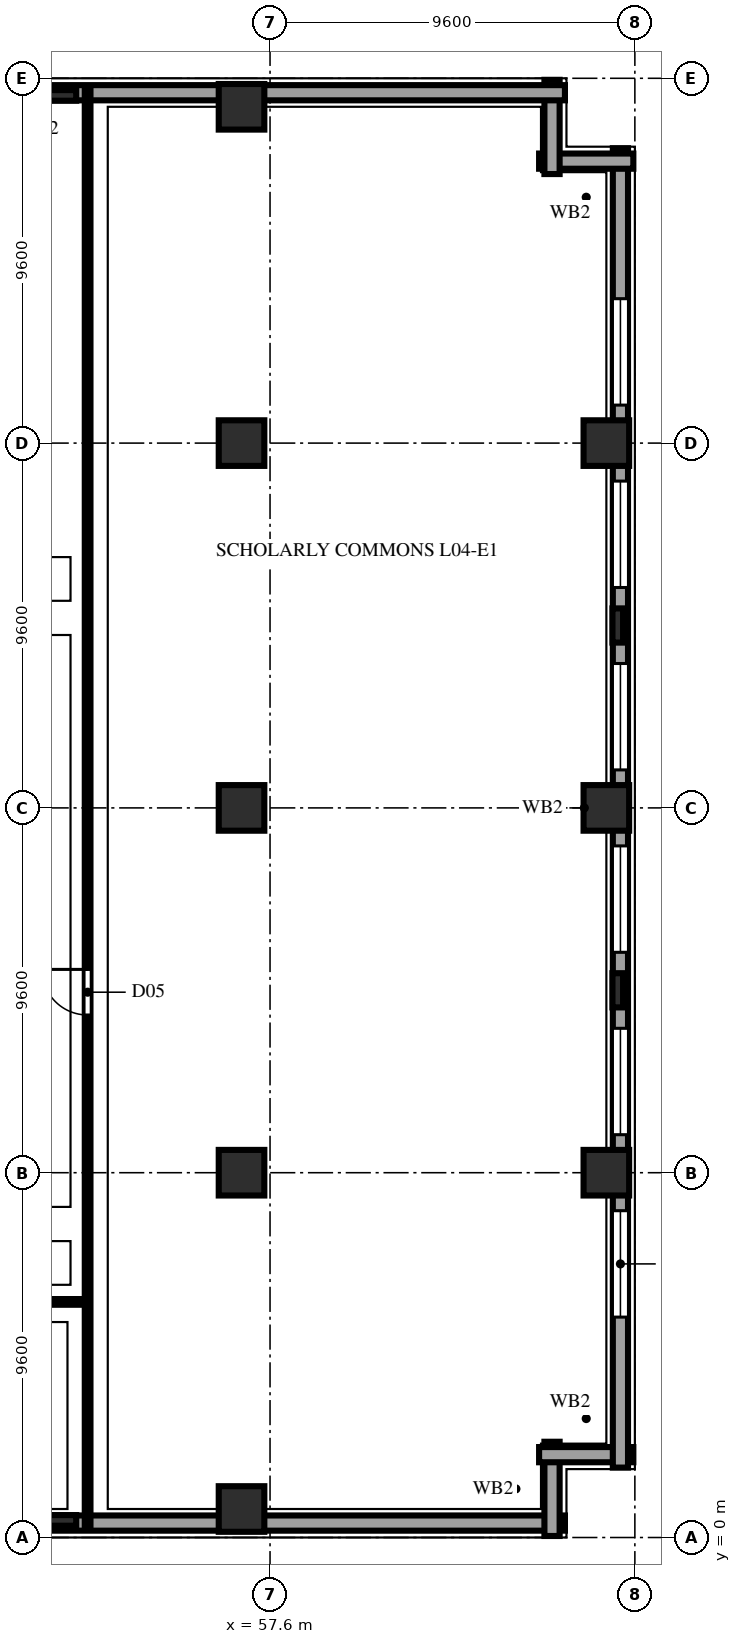
"""IFC4 building model, lengths in metres.
Left out: names, types, materials, properties, quantities, classifications, styles, units other than length and angle.
Written with IfcOpenShell. Run it as: python <this file> out.ifc"""

import sys

from ifc_helpers import new_model, si_unit, direction, frame, frame_2d, origin, origin_2d, place, context, subcontext, project, spatial, rectangle, extrude, element, fill, save


model = new_model("IFC4")
c1 = context("Model", 3, precision=1e-05, world=origin(), true_north=direction((0.0, 1.0)))
c2 = subcontext(c1, "Body", "Model", "MODEL_VIEW")
j1 = project(units=[si_unit("LENGTHUNIT", "METRE"), si_unit("PLANEANGLEUNIT", "RADIAN")], contexts=[c1])
p1 = place(None, origin())
s1 = spatial("IfcSite", under=j1, at=p1, CompositionType="ELEMENT")
p2 = place(p1, origin())
s2 = spatial("IfcBuilding", under=s1, at=p2, CompositionType="ELEMENT")
p3 = place(p2, frame((0.0, 0.0, 19.6)))
s3 = spatial("IfcBuildingStorey", under=s2, at=p3, CompositionType="ELEMENT", Elevation=19.6)
for number, where, z_axis, x_axis in (
    (1, (56.85, 0.75, 0.0), (0.0, 0.0, 1.0), (1.0, 0.0, 0.0)),
    (2, (56.85, 9.6, 0.0), (0.0, 0.0, 1.0), (1.0, 0.0, 0.0)),
    (3, (56.85, 19.2, 0.0), (0.0, 0.0, 1.0), (1.0, 0.0, 0.0)),
    (4, (56.85, 28.8, 0.0), (0.0, 0.0, 1.0), (1.0, 0.0, 0.0)),
    (5, (56.85, 37.65, 0.0), (0.0, 0.0, 1.0), (1.0, 0.0, 0.0)),
    (6, (66.45, 9.6, 0.0), (0.0, 0.0, 1.0), (1.0, 0.0, 0.0)),
    (7, (66.45, 19.2, 0.0), (0.0, 0.0, 1.0), (1.0, 0.0, 0.0)),
    (8, (66.45, 28.8, 0.0), (0.0, 0.0, 1.0), (1.0, 0.0, 0.0)),
):
    element("IfcColumn", number, at=place(p3, frame(where, z_axis=z_axis, x_axis=x_axis)), inside=s3, PredefinedType="COLUMN", context=c2, shape_type="SweptSolid", body=[
        extrude(rectangle(XDim=1.2, YDim=1.2, at=origin_2d()), origin(), (0.0, 0.0, 1.0), 4.6),
    ])
for number, where, z_axis, x_axis in (
    (9, (52.05, 0.45, 0.0), (0.0, 0.0, 1.0), (1.0, 0.0, 0.0)),
    (10, (66.75, 14.4, 0.0), (0.0, 0.0, 1.0), (0.0, 1.0, 0.0)),
    (11, (66.75, 24.0, 0.0), (0.0, 0.0, 1.0), (0.0, 1.0, 0.0)),
    (12, (52.05, 37.95, 0.0), (0.0, 0.0, 1.0), (1.0, 0.0, 0.0)),
):
    element("IfcColumn", number, at=place(p3, frame(where, z_axis=z_axis, x_axis=x_axis)), inside=s3, PredefinedType="PILASTER", context=c2, shape_type="SweptSolid", body=[
        extrude(rectangle(XDim=0.9, YDim=0.28, at=origin_2d()), origin(), (0.0, 0.0, 1.0), 4.6),
    ])
p4 = place(p3, frame((1.84, 0.38, 0.0), z_axis=(0.0, 0.0, 1.0), x_axis=(1.0, 0.0, 0.0)))
e13 = element("IfcWall", 13, at=p4, inside=s3, PredefinedType="SOLIDWALL", context=c2, shape_type="SweptSolid", body=[
    extrude(rectangle(XDim=63.52, YDim=0.4, at=frame_2d((31.76, 0.0))), origin(), (0.0, 0.0, 1.0), 4.34),
])
p5 = place(p4, frame((3.96, 0.0, 0.75)))
e14 = element("IfcOpeningElement", 14, at=p5, cuts=e13, PredefinedType="OPENING", context=c2, shape_type="SweptSolid", body=[
    extrude(rectangle(XDim=2.8, YDim=2.3, at=frame_2d((1.4, 1.15))), frame((0.0, 0.212, 0.0), z_axis=(0.0, -1.0, 0.0), x_axis=(1.0, 0.0, 0.0)), (0.0, 0.0, 1.0), 0.424),
])
p6 = place(p4, frame((8.76, 0.0, 0.75)))
e15 = element("IfcOpeningElement", 15, at=p6, cuts=e13, PredefinedType="OPENING", context=c2, shape_type="SweptSolid", body=[
    extrude(rectangle(XDim=2.8, YDim=2.3, at=frame_2d((1.4, 1.15))), frame((0.0, 0.212, 0.0), z_axis=(0.0, -1.0, 0.0), x_axis=(1.0, 0.0, 0.0)), (0.0, 0.0, 1.0), 0.424),
])
p7 = place(p4, frame((13.56, 0.0, 0.75)))
e16 = element("IfcOpeningElement", 16, at=p7, cuts=e13, PredefinedType="OPENING", context=c2, shape_type="SweptSolid", body=[
    extrude(rectangle(XDim=2.8, YDim=2.3, at=frame_2d((1.4, 1.15))), frame((0.0, 0.212, 0.0), z_axis=(0.0, -1.0, 0.0), x_axis=(1.0, 0.0, 0.0)), (0.0, 0.0, 1.0), 0.424),
])
p8 = place(p4, frame((18.36, 0.0, 0.75)))
e17 = element("IfcOpeningElement", 17, at=p8, cuts=e13, PredefinedType="OPENING", context=c2, shape_type="SweptSolid", body=[
    extrude(rectangle(XDim=2.8, YDim=2.3, at=frame_2d((1.4, 1.15))), frame((0.0, 0.212, 0.0), z_axis=(0.0, -1.0, 0.0), x_axis=(1.0, 0.0, 0.0)), (0.0, 0.0, 1.0), 0.424),
])
p9 = place(p4, frame((23.16, 0.0, 0.75)))
e18 = element("IfcOpeningElement", 18, at=p9, cuts=e13, PredefinedType="OPENING", context=c2, shape_type="SweptSolid", body=[
    extrude(rectangle(XDim=2.8, YDim=2.3, at=frame_2d((1.4, 1.15))), frame((0.0, 0.212, 0.0), z_axis=(0.0, -1.0, 0.0), x_axis=(1.0, 0.0, 0.0)), (0.0, 0.0, 1.0), 0.424),
])
p10 = place(p4, frame((27.96, 0.0, 0.75)))
e19 = element("IfcOpeningElement", 19, at=p10, cuts=e13, PredefinedType="OPENING", context=c2, shape_type="SweptSolid", body=[
    extrude(rectangle(XDim=2.8, YDim=2.3, at=frame_2d((1.4, 1.15))), frame((0.0, 0.212, 0.0), z_axis=(0.0, -1.0, 0.0), x_axis=(1.0, 0.0, 0.0)), (0.0, 0.0, 1.0), 0.424),
])
for number, where, z_axis, x_axis in (
    (20, (65.02, 0.04, 0.0), (0.0, 0.0, 1.0), (0.0, 1.0, 0.0)),
    (21, (64.68, 2.18, 0.0), (0.0, 0.0, 1.0), (1.0, 0.0, 0.0)),
):
    element("IfcWall", number, at=place(p3, frame(where, z_axis=z_axis, x_axis=x_axis)), inside=s3, PredefinedType="SOLIDWALL", context=c2, shape_type="SweptSolid", body=[
        extrude(rectangle(XDim=2.48, YDim=0.4, at=frame_2d((1.24, 0.0))), origin(), (0.0, 0.0, 1.0), 4.34),
    ])
p11 = place(p3, frame((66.82, 1.84, 0.0), z_axis=(0.0, 0.0, 1.0), x_axis=(0.0, 1.0, 0.0)))
e22 = element("IfcWall", 22, at=p11, inside=s3, PredefinedType="SOLIDWALL", context=c2, shape_type="SweptSolid", body=[
    extrude(rectangle(XDim=34.72, YDim=0.4, at=frame_2d((17.36, 0.0))), origin(), (0.0, 0.0, 1.0), 4.34),
])
p12 = place(p11, frame((3.96, 0.0, 0.75)))
e23 = element("IfcOpeningElement", 23, at=p12, cuts=e22, PredefinedType="OPENING", context=c2, shape_type="SweptSolid", body=[
    extrude(rectangle(XDim=2.8, YDim=2.3, at=frame_2d((1.4, 1.15))), frame((0.0, 0.212, 0.0), z_axis=(0.0, -1.0, 0.0), x_axis=(1.0, 0.0, 0.0)), (0.0, 0.0, 1.0), 0.424),
])
p13 = place(p11, frame((8.76, 0.0, 0.75)))
e24 = element("IfcOpeningElement", 24, at=p13, cuts=e22, PredefinedType="OPENING", context=c2, shape_type="SweptSolid", body=[
    extrude(rectangle(XDim=2.8, YDim=2.3, at=frame_2d((1.4, 1.15))), frame((0.0, 0.212, 0.0), z_axis=(0.0, -1.0, 0.0), x_axis=(1.0, 0.0, 0.0)), (0.0, 0.0, 1.0), 0.424),
])
p14 = place(p11, frame((13.56, 0.0, 0.75)))
e25 = element("IfcOpeningElement", 25, at=p14, cuts=e22, PredefinedType="OPENING", context=c2, shape_type="SweptSolid", body=[
    extrude(rectangle(XDim=2.8, YDim=2.3, at=frame_2d((1.4, 1.15))), frame((0.0, 0.212, 0.0), z_axis=(0.0, -1.0, 0.0), x_axis=(1.0, 0.0, 0.0)), (0.0, 0.0, 1.0), 0.424),
])
p15 = place(p11, frame((18.36, 0.0, 0.75)))
e26 = element("IfcOpeningElement", 26, at=p15, cuts=e22, PredefinedType="OPENING", context=c2, shape_type="SweptSolid", body=[
    extrude(rectangle(XDim=2.8, YDim=2.3, at=frame_2d((1.4, 1.15))), frame((0.0, 0.212, 0.0), z_axis=(0.0, -1.0, 0.0), x_axis=(1.0, 0.0, 0.0)), (0.0, 0.0, 1.0), 0.424),
])
p16 = place(p11, frame((23.16, 0.0, 0.75)))
e27 = element("IfcOpeningElement", 27, at=p16, cuts=e22, PredefinedType="OPENING", context=c2, shape_type="SweptSolid", body=[
    extrude(rectangle(XDim=2.8, YDim=2.3, at=frame_2d((1.4, 1.15))), frame((0.0, 0.212, 0.0), z_axis=(0.0, -1.0, 0.0), x_axis=(1.0, 0.0, 0.0)), (0.0, 0.0, 1.0), 0.424),
])
p17 = place(p11, frame((27.96, 0.0, 0.75)))
e28 = element("IfcOpeningElement", 28, at=p17, cuts=e22, PredefinedType="OPENING", context=c2, shape_type="SweptSolid", body=[
    extrude(rectangle(XDim=2.8, YDim=2.3, at=frame_2d((1.4, 1.15))), frame((0.0, 0.212, 0.0), z_axis=(0.0, -1.0, 0.0), x_axis=(1.0, 0.0, 0.0)), (0.0, 0.0, 1.0), 0.424),
])
p18 = place(p3, frame((67.16, 36.22, 0.0), z_axis=(0.0, 0.0, 1.0), x_axis=(-1.0, 0.0, 0.0)))
e29 = element("IfcWall", 29, at=p18, inside=s3, PredefinedType="SOLIDWALL", context=c2, shape_type="SweptSolid", body=[
    extrude(rectangle(XDim=2.48, YDim=0.4, at=frame_2d((1.24, 0.0))), origin(), (0.0, 0.0, 1.0), 4.34),
])
p19 = place(p3, frame((65.02, 35.88, 0.0), z_axis=(0.0, 0.0, 1.0), x_axis=(0.0, 1.0, 0.0)))
e30 = element("IfcWall", 30, at=p19, inside=s3, PredefinedType="SOLIDWALL", context=c2, shape_type="SweptSolid", body=[
    extrude(rectangle(XDim=2.48, YDim=0.4, at=frame_2d((1.24, 0.0))), origin(), (0.0, 0.0, 1.0), 4.34),
])
p20 = place(p3, frame((65.36, 38.02, 0.0), z_axis=(0.0, 0.0, 1.0), x_axis=(-1.0, 0.0, 0.0)))
e31 = element("IfcWall", 31, at=p20, inside=s3, PredefinedType="SOLIDWALL", context=c2, shape_type="SweptSolid", body=[
    extrude(rectangle(XDim=27.68, YDim=0.4, at=frame_2d((13.84, 0.0))), origin(), (0.0, 0.0, 1.0), 4.34),
])
p21 = place(p3, frame((0.22, 6.2, 0.0), z_axis=(0.0, 0.0, 1.0), x_axis=(1.0, 0.0, 0.0)))
e32 = element("IfcWall", 32, at=p21, inside=s3, PredefinedType="PARTITIONING", context=c2, shape_type="SweptSolid", body=[
    extrude(rectangle(XDim=52.58, YDim=0.15, at=frame_2d((26.29, 0.0))), origin(), (0.0, 0.0, 1.0), 4.34),
])
p22 = place(p21, frame((13.58, 0.0, 0.0)))
e33 = element("IfcOpeningElement", 33, at=p22, cuts=e32, PredefinedType="OPENING", context=c2, shape_type="SweptSolid", body=[
    extrude(rectangle(XDim=1.2, YDim=2.2, at=frame_2d((0.6, 1.1))), frame((0.0, 0.087, 0.0), z_axis=(0.0, -1.0, 0.0), x_axis=(1.0, 0.0, 0.0)), (0.0, 0.0, 1.0), 0.174),
])
p23 = place(p21, frame((23.28, 0.0, 0.0)))
e34 = element("IfcOpeningElement", 34, at=p23, cuts=e32, PredefinedType="OPENING", context=c2, shape_type="SweptSolid", body=[
    extrude(rectangle(XDim=1.2, YDim=2.2, at=frame_2d((0.6, 1.1))), frame((0.0, 0.087, 0.0), z_axis=(0.0, -1.0, 0.0), x_axis=(1.0, 0.0, 0.0)), (0.0, 0.0, 1.0), 0.174),
])
p24 = place(p21, frame((41.18, 0.0, 0.0)))
e35 = element("IfcOpeningElement", 35, at=p24, cuts=e32, PredefinedType="OPENING", context=c2, shape_type="SweptSolid", body=[
    extrude(rectangle(XDim=2.0, YDim=2.3, at=frame_2d((1.0, 1.15))), frame((0.0, 0.087, 0.0), z_axis=(0.0, -1.0, 0.0), x_axis=(1.0, 0.0, 0.0)), (0.0, 0.0, 1.0), 0.174),
])
p25 = place(p3, frame((52.8, 0.22, 0.0), z_axis=(0.0, 0.0, 1.0), x_axis=(0.0, 1.0, 0.0)))
e36 = element("IfcWall", 36, at=p25, inside=s3, PredefinedType="PARTITIONING", context=c2, shape_type="SweptSolid", body=[
    extrude(rectangle(XDim=37.96, YDim=0.15, at=frame_2d((18.98, 0.0))), origin(), (0.0, 0.0, 1.0), 4.34),
])
p26 = place(p25, frame((13.53, 0.0, 0.0)))
e37 = element("IfcOpeningElement", 37, at=p26, cuts=e36, PredefinedType="OPENING", context=c2, shape_type="SweptSolid", body=[
    extrude(rectangle(XDim=1.2, YDim=2.2, at=frame_2d((0.6, 1.1))), frame((0.0, 0.087, 0.0), z_axis=(0.0, -1.0, 0.0), x_axis=(1.0, 0.0, 0.0)), (0.0, 0.0, 1.0), 0.174),
])
p27 = place(p12, origin())
e38 = element("IfcWindow", 38, at=p27, inside=s3, PartitioningType="TRIPLE_PANEL_VERTICAL", PredefinedType="WINDOW", context=c2, shape_type="SweptSolid", body=[
    extrude(rectangle(XDim=2.8, YDim=2.3, at=frame_2d((1.4, 1.15))), frame((0.0, 0.11, 0.0), z_axis=(0.0, -1.0, 0.0), x_axis=(1.0, 0.0, 0.0)), (0.0, 0.0, 1.0), 0.06),
])
fill(e23, e38)
p28 = place(p13, origin())
e39 = element("IfcWindow", 39, at=p28, inside=s3, PartitioningType="TRIPLE_PANEL_VERTICAL", PredefinedType="WINDOW", context=c2, shape_type="SweptSolid", body=[
    extrude(rectangle(XDim=2.8, YDim=2.3, at=frame_2d((1.4, 1.15))), frame((0.0, 0.11, 0.0), z_axis=(0.0, -1.0, 0.0), x_axis=(1.0, 0.0, 0.0)), (0.0, 0.0, 1.0), 0.06),
])
fill(e24, e39)
p29 = place(p14, origin())
e40 = element("IfcWindow", 40, at=p29, inside=s3, PartitioningType="TRIPLE_PANEL_VERTICAL", PredefinedType="WINDOW", context=c2, shape_type="SweptSolid", body=[
    extrude(rectangle(XDim=2.8, YDim=2.3, at=frame_2d((1.4, 1.15))), frame((0.0, 0.11, 0.0), z_axis=(0.0, -1.0, 0.0), x_axis=(1.0, 0.0, 0.0)), (0.0, 0.0, 1.0), 0.06),
])
fill(e25, e40)
p30 = place(p15, origin())
e41 = element("IfcWindow", 41, at=p30, inside=s3, PartitioningType="TRIPLE_PANEL_VERTICAL", PredefinedType="WINDOW", context=c2, shape_type="SweptSolid", body=[
    extrude(rectangle(XDim=2.8, YDim=2.3, at=frame_2d((1.4, 1.15))), frame((0.0, 0.11, 0.0), z_axis=(0.0, -1.0, 0.0), x_axis=(1.0, 0.0, 0.0)), (0.0, 0.0, 1.0), 0.06),
])
fill(e26, e41)
p31 = place(p16, origin())
e42 = element("IfcWindow", 42, at=p31, inside=s3, PartitioningType="TRIPLE_PANEL_VERTICAL", PredefinedType="WINDOW", context=c2, shape_type="SweptSolid", body=[
    extrude(rectangle(XDim=2.8, YDim=2.3, at=frame_2d((1.4, 1.15))), frame((0.0, 0.11, 0.0), z_axis=(0.0, -1.0, 0.0), x_axis=(1.0, 0.0, 0.0)), (0.0, 0.0, 1.0), 0.06),
])
fill(e27, e42)
p32 = place(p17, origin())
e43 = element("IfcWindow", 43, at=p32, inside=s3, PartitioningType="TRIPLE_PANEL_VERTICAL", PredefinedType="WINDOW", context=c2, shape_type="SweptSolid", body=[
    extrude(rectangle(XDim=2.8, YDim=2.3, at=frame_2d((1.4, 1.15))), frame((0.0, 0.11, 0.0), z_axis=(0.0, -1.0, 0.0), x_axis=(1.0, 0.0, 0.0)), (0.0, 0.0, 1.0), 0.06),
])
fill(e28, e43)
p33 = place(p26, origin())
e44 = element("IfcDoor", 44, at=p33, inside=s3, OperationType="SINGLE_SWING_RIGHT", PredefinedType="DOOR", context=c2, shape_type="SweptSolid", body=[
    extrude(rectangle(XDim=1.2, YDim=2.2, at=frame_2d((0.6, 1.1))), frame((0.0, 0.025, 0.0), z_axis=(0.0, -1.0, 0.0), x_axis=(1.0, 0.0, 0.0)), (0.0, 0.0, 1.0), 0.05),
])
fill(e37, e44)
save(model, sys.argv[1])
